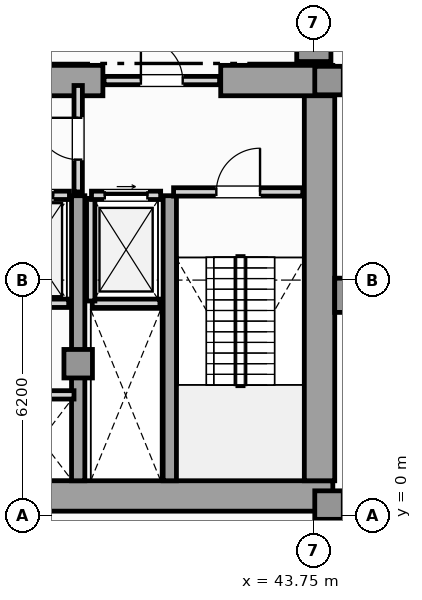
"""IFC4 building model, lengths in metres.
Left out: names, types, materials, properties, quantities, classifications, styles, units other than length and angle.
Written with IfcOpenShell. Run it as: python <this file> out.ifc"""

import sys

from ifc_helpers import new_model, si_unit, direction, frame, frame_2d, origin, origin_2d, place, context, subcontext, project, spatial, rectangle, extrude, element, fill, save


model = new_model("IFC4")
c1 = context("Model", 3, precision=1e-05, world=origin(), true_north=direction((0.0, 1.0)))
c2 = subcontext(c1, "Body", "Model", "MODEL_VIEW")
j1 = project(units=[si_unit("LENGTHUNIT", "METRE"), si_unit("PLANEANGLEUNIT", "RADIAN")], contexts=[c1])
p1 = place(None, origin())
s1 = spatial("IfcSite", under=j1, at=p1, CompositionType="ELEMENT")
p2 = place(p1, origin())
s2 = spatial("IfcBuilding", under=s1, at=p2, CompositionType="ELEMENT")
p3 = place(p2, frame((0.0, 0.0, 15.0)))
s3 = spatial("IfcBuildingStorey", under=s2, at=p3, CompositionType="ELEMENT", Elevation=15.0)
p4 = place(p3, frame((13.25, 0.52, 0.0), z_axis=(0.0, 0.0, 1.0), x_axis=(1.0, 0.0, 0.0)))
e1 = element("IfcWall", 1, at=p4, inside=s3, PredefinedType="SHEAR", context=c2, shape_type="SweptSolid", body=[
    extrude(rectangle(XDim=31.0, YDim=0.8, at=frame_2d((15.5, 0.0))), origin(), (0.0, 0.0, 1.0), 4.5),
])
p5 = place(p3, frame((43.9, 0.92, 0.0), z_axis=(0.0, 0.0, 1.0), x_axis=(0.0, 1.0, 0.0)))
e2 = element("IfcWall", 2, at=p5, inside=s3, PredefinedType="SHEAR", context=c2, shape_type="SweptSolid", body=[
    extrude(rectangle(XDim=10.53, YDim=0.8, at=frame_2d((5.265, 0.0))), origin(), (0.0, 0.0, 1.0), 4.5),
])
p6 = place(p3, frame((30.9, 11.45, 0.0), z_axis=(0.0, 0.0, 1.0), x_axis=(1.0, 0.0, 0.0)))
e3 = element("IfcWall", 3, at=p6, inside=s3, PredefinedType="SHEAR", context=c2, shape_type="SweptSolid", body=[
    extrude(rectangle(XDim=7.3, YDim=0.8, at=frame_2d((3.65, 0.0))), origin(), (0.0, 0.0, 1.0), 4.5),
])
p7 = place(p3, frame((41.3, 11.45, 0.0), z_axis=(0.0, 0.0, 1.0), x_axis=(1.0, 0.0, 0.0)))
e4 = element("IfcWall", 4, at=p7, inside=s3, PredefinedType="SHEAR", context=c2, shape_type="SweptSolid", body=[
    extrude(rectangle(XDim=2.95, YDim=0.8, at=frame_2d((1.475, 0.0))), origin(), (0.0, 0.0, 1.0), 4.5),
])
for number, where, z_axis, x_axis in (
    (5, (37.55, 0.92, 0.0), (0.0, 0.0, 1.0), (0.0, 1.0, 0.0)),
    (6, (39.96, 0.92, 0.0), (0.0, 0.0, 1.0), (0.0, 1.0, 0.0)),
):
    element("IfcWall", number, at=place(p3, frame(where, z_axis=z_axis, x_axis=x_axis)), inside=s3, PredefinedType="SHEAR", context=c2, shape_type="SweptSolid", body=[
        extrude(rectangle(XDim=7.5, YDim=0.35, at=frame_2d((3.75, 0.0))), origin(), (0.0, 0.0, 1.0), 4.5),
    ])
p8 = place(p3, frame((44.6, 5.8, 0.0), z_axis=(0.0, 0.0, 1.0), x_axis=(1.0, 0.0, 0.0)))
e7 = element("IfcColumn", 7, at=p8, inside=s3, PredefinedType="PILASTER", context=c2, shape_type="SweptSolid", body=[
    extrude(rectangle(XDim=0.6, YDim=0.9, at=origin_2d()), origin(), (0.0, 0.0, 1.0), 4.8),
])
for number, where, z_axis, x_axis in (
    (8, (44.15, 0.28, 0.0), (0.0, 0.0, 1.0), (1.0, 0.0, 0.0)),
    (9, (44.15, 11.45, 0.0), (0.0, 0.0, 1.0), (1.0, 0.0, 0.0)),
    (10, (37.55, 4.0, 0.0), (0.0, 0.0, 1.0), (1.0, 0.0, 0.0)),
):
    element("IfcColumn", number, at=place(p3, frame(where, z_axis=z_axis, x_axis=x_axis)), inside=s3, PredefinedType="COLUMN", context=c2, shape_type="SweptSolid", body=[
        extrude(rectangle(XDim=0.75, YDim=0.75, at=origin_2d()), origin(), (0.0, 0.0, 1.0), 4.8),
    ])
p9 = place(p3, frame((43.75, 12.4, 0.0), z_axis=(0.0, 0.0, 1.0), x_axis=(1.0, 0.0, 0.0)))
e11 = element("IfcColumn", 11, at=p9, inside=s3, PredefinedType="COLUMN", context=c2, shape_type="SweptSolid", body=[
    extrude(rectangle(XDim=0.9, YDim=0.9, at=origin_2d()), origin(), (0.0, 0.0, 1.0), 4.8),
])
p10 = place(p3, frame((37.92, 5.59, 0.0), z_axis=(0.0, 0.0, 1.0), x_axis=(1.0, 0.0, 0.0)))
e12 = element("IfcWall", 12, at=p10, inside=s3, PredefinedType="SOLIDWALL", context=c2, shape_type="SweptSolid", body=[
    extrude(rectangle(XDim=1.78, YDim=0.22, at=frame_2d((0.89, 0.0))), origin(), (0.0, 0.0, 1.0), 4.5),
])
p11 = place(p3, frame((37.88, 5.65, 0.0), z_axis=(0.0, 0.0, 1.0), x_axis=(0.0, 1.0, 0.0)))
e13 = element("IfcWall", 13, at=p11, inside=s3, PredefinedType="SOLIDWALL", context=c2, shape_type="SweptSolid", body=[
    extrude(rectangle(XDim=2.7, YDim=0.22, at=frame_2d((1.35, 0.0))), origin(), (0.0, 0.0, 1.0), 4.5),
])
p12 = place(p3, frame((37.9, 8.43, 0.0), z_axis=(0.0, 0.0, 1.0), x_axis=(1.0, 0.0, 0.0)))
e14 = element("IfcWall", 14, at=p12, inside=s3, PredefinedType="SOLIDWALL", context=c2, shape_type="SweptSolid", body=[
    extrude(rectangle(XDim=1.82, YDim=0.22, at=frame_2d((0.91, 0.0))), origin(), (0.0, 0.0, 1.0), 4.5),
])
p13 = place(p12, frame((0.35, 0.0, 0.0)))
e15 = element("IfcOpeningElement", 15, at=p13, cuts=e14, PredefinedType="OPENING", context=c2, shape_type="SweptSolid", body=[
    extrude(rectangle(XDim=1.12, YDim=2.25, at=frame_2d((0.56, 1.125))), frame((0.0, 0.12, 0.0), z_axis=(0.0, -1.0, 0.0), x_axis=(1.0, 0.0, 0.0)), (0.0, 0.0, 1.0), 0.24),
])
p14 = place(p3, frame((35.3, 5.59, 0.0), z_axis=(0.0, 0.0, 1.0), x_axis=(1.0, 0.0, 0.0)))
e16 = element("IfcWall", 16, at=p14, inside=s3, PredefinedType="SOLIDWALL", context=c2, shape_type="SweptSolid", body=[
    extrude(rectangle(XDim=2.0, YDim=0.22, at=frame_2d((1.0, 0.0))), origin(), (0.0, 0.0, 1.0), 4.5),
])
p15 = place(p3, frame((35.28, 8.43, 0.0), z_axis=(0.0, 0.0, 1.0), x_axis=(1.0, 0.0, 0.0)))
e17 = element("IfcWall", 17, at=p15, inside=s3, PredefinedType="SOLIDWALL", context=c2, shape_type="SweptSolid", body=[
    extrude(rectangle(XDim=2.04, YDim=0.22, at=frame_2d((1.02, 0.0))), origin(), (0.0, 0.0, 1.0), 4.5),
])
p16 = place(p15, frame((0.43, 0.0, 0.0)))
e18 = element("IfcOpeningElement", 18, at=p16, cuts=e17, PredefinedType="OPENING", context=c2, shape_type="SweptSolid", body=[
    extrude(rectangle(XDim=1.18, YDim=2.2, at=frame_2d((0.59, 1.1))), frame((0.0, 0.12, 0.0), z_axis=(0.0, -1.0, 0.0), x_axis=(1.0, 0.0, 0.0)), (0.0, 0.0, 1.0), 0.24),
])
p17 = place(p3, frame((35.7, 3.18, 0.0), z_axis=(0.0, 0.0, 1.0), x_axis=(1.0, 0.0, 0.0)))
e19 = element("IfcWall", 19, at=p17, inside=s3, PredefinedType="SOLIDWALL", context=c2, shape_type="SweptSolid", body=[
    extrude(rectangle(XDim=1.74, YDim=0.22, at=frame_2d((0.87, 0.0))), origin(), (0.0, 0.0, 1.0), 4.5),
])
p18 = place(p3, frame((40.06, 8.52, 0.0), z_axis=(0.0, 0.0, 1.0), x_axis=(1.0, 0.0, 0.0)))
e20 = element("IfcWall", 20, at=p18, inside=s3, PredefinedType="SOLIDWALL", context=c2, shape_type="SweptSolid", body=[
    extrude(rectangle(XDim=3.4, YDim=0.22, at=frame_2d((1.7, 0.0))), origin(), (0.0, 0.0, 1.0), 4.5),
])
p19 = place(p18, frame((1.125, 0.0, 0.0)))
e21 = element("IfcOpeningElement", 21, at=p19, cuts=e20, PredefinedType="OPENING", context=c2, shape_type="SweptSolid", body=[
    extrude(rectangle(XDim=1.15, YDim=2.2, at=frame_2d((0.575, 1.1))), frame((0.0, 0.12, 0.0), z_axis=(0.0, -1.0, 0.0), x_axis=(1.0, 0.0, 0.0)), (0.0, 0.0, 1.0), 0.24),
])
p20 = place(p3, frame((37.55, 8.52, 0.0), z_axis=(0.0, 0.0, 1.0), x_axis=(0.0, 1.0, 0.0)))
e22 = element("IfcWall", 22, at=p20, inside=s3, PredefinedType="SOLIDWALL", context=c2, shape_type="SweptSolid", body=[
    extrude(rectangle(XDim=2.8, YDim=0.22, at=frame_2d((1.4, 0.0))), origin(), (0.0, 0.0, 1.0), 3.956),
])
p21 = place(p20, frame((0.85, 0.0, 0.0)))
e23 = element("IfcOpeningElement", 23, at=p21, cuts=e22, PredefinedType="OPENING", context=c2, shape_type="SweptSolid", body=[
    extrude(rectangle(XDim=1.1, YDim=2.2, at=frame_2d((0.55, 1.1))), frame((0.0, 0.12, 0.0), z_axis=(0.0, -1.0, 0.0), x_axis=(1.0, 0.0, 0.0)), (0.0, 0.0, 1.0), 0.24),
])
p22 = place(p3, frame((38.23, 11.45, 0.0), z_axis=(0.0, 0.0, 1.0), x_axis=(1.0, 0.0, 0.0)))
e24 = element("IfcWall", 24, at=p22, inside=s3, PredefinedType="SOLIDWALL", context=c2, shape_type="SweptSolid", body=[
    extrude(rectangle(XDim=3.04, YDim=0.22, at=frame_2d((1.52, 0.0))), origin(), (0.0, 0.0, 1.0), 4.5),
])
p23 = place(p22, frame((0.97, 0.0, 0.0)))
e25 = element("IfcOpeningElement", 25, at=p23, cuts=e24, PredefinedType="OPENING", context=c2, shape_type="SweptSolid", body=[
    extrude(rectangle(XDim=1.1, YDim=2.2, at=frame_2d((0.55, 1.1))), frame((0.0, 0.12, 0.0), z_axis=(0.0, -1.0, 0.0), x_axis=(1.0, 0.0, 0.0)), (0.0, 0.0, 1.0), 0.24),
])
p24 = place(p13, origin())
e26 = element("IfcDoor", 26, at=p24, inside=s3, OperationType="SLIDING_TO_RIGHT", PredefinedType="DOOR", context=c2, shape_type="SweptSolid", body=[
    extrude(rectangle(XDim=1.12, YDim=2.25, at=frame_2d((0.56, 1.125))), frame((0.0, 0.025, 0.0), z_axis=(0.0, -1.0, 0.0), x_axis=(1.0, 0.0, 0.0)), (0.0, 0.0, 1.0), 0.05),
])
fill(e15, e26)
p25 = place(p16, origin())
e27 = element("IfcDoor", 27, at=p25, inside=s3, OperationType="SLIDING_TO_LEFT", PredefinedType="DOOR", context=c2, shape_type="SweptSolid", body=[
    extrude(rectangle(XDim=1.18, YDim=2.2, at=frame_2d((0.59, 1.1))), frame((0.0, 0.025, 0.0), z_axis=(0.0, -1.0, 0.0), x_axis=(1.0, 0.0, 0.0)), (0.0, 0.0, 1.0), 0.05),
])
fill(e18, e27)
p26 = place(p19, origin())
e28 = element("IfcDoor", 28, at=p26, inside=s3, OperationType="SINGLE_SWING_RIGHT", PredefinedType="DOOR", context=c2, shape_type="SweptSolid", body=[
    extrude(rectangle(XDim=1.15, YDim=2.2, at=frame_2d((0.575, 1.1))), frame((0.0, 0.025, 0.0), z_axis=(0.0, -1.0, 0.0), x_axis=(1.0, 0.0, 0.0)), (0.0, 0.0, 1.0), 0.05),
])
fill(e21, e28)
p27 = place(p21, origin())
e29 = element("IfcDoor", 29, at=p27, inside=s3, OperationType="SINGLE_SWING_RIGHT", PredefinedType="DOOR", context=c2, shape_type="SweptSolid", body=[
    extrude(rectangle(XDim=1.1, YDim=2.2, at=frame_2d((0.55, 1.1))), frame((0.0, 0.025, 0.0), z_axis=(0.0, -1.0, 0.0), x_axis=(1.0, 0.0, 0.0)), (0.0, 0.0, 1.0), 0.05),
])
fill(e23, e29)
p28 = place(p23, origin())
e30 = element("IfcDoor", 30, at=p28, inside=s3, OperationType="SINGLE_SWING_LEFT", PredefinedType="DOOR", context=c2, shape_type="SweptSolid", body=[
    extrude(rectangle(XDim=1.1, YDim=2.2, at=frame_2d((0.55, 1.1))), frame((0.0, 0.025, 0.0), z_axis=(0.0, -1.0, 0.0), x_axis=(1.0, 0.0, 0.0)), (0.0, 0.0, 1.0), 0.05),
])
fill(e25, e30)
save(model, sys.argv[1])
